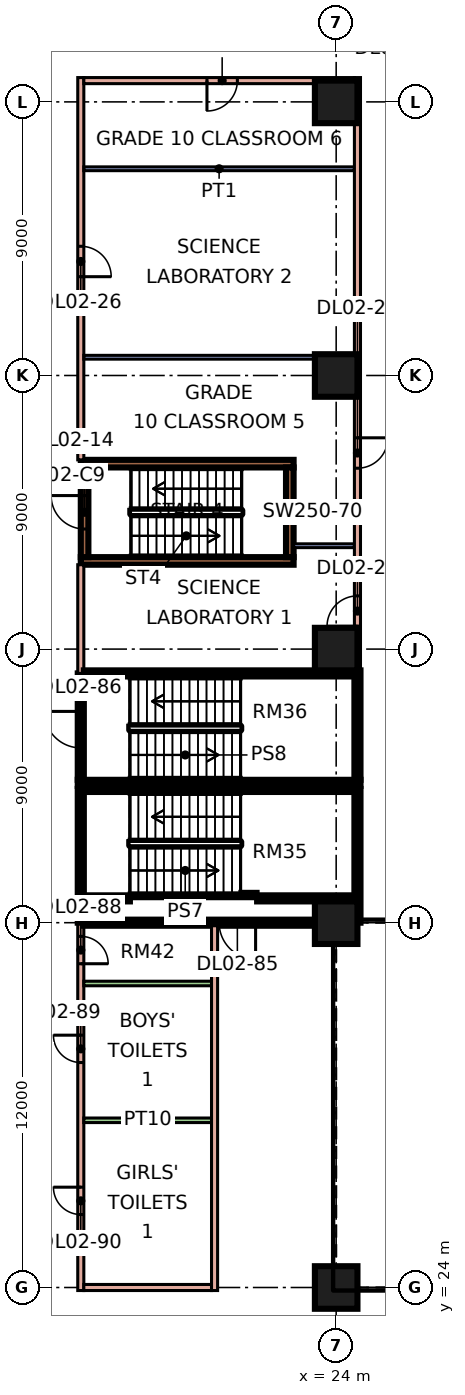
"""IFC4 building model, lengths in metres.
Left out: names, types, materials, properties, quantities, classifications, styles, units other than length and angle.
Written with IfcOpenShell. Run it as: python <this file> out.ifc"""

import sys

from ifc_helpers import new_model, si_unit, direction, frame, frame_2d, origin, origin_2d, place, context, subcontext, project, spatial, rectangle, extrude, element, fill, save


model = new_model("IFC4")
c1 = context("Model", 3, precision=1e-05, world=origin(), true_north=direction((0.0, 1.0)))
c2 = subcontext(c1, "Body", "Model", "MODEL_VIEW")
j1 = project(units=[si_unit("LENGTHUNIT", "METRE"), si_unit("PLANEANGLEUNIT", "RADIAN")], contexts=[c1])
p1 = place(None, origin())
s1 = spatial("IfcSite", under=j1, at=p1, CompositionType="ELEMENT")
p2 = place(p1, origin())
s2 = spatial("IfcBuilding", under=s1, at=p2, CompositionType="ELEMENT")
p3 = place(p2, frame((0.0, 0.0, 12.0)))
s3 = spatial("IfcBuildingStorey", under=s2, at=p3, CompositionType="ELEMENT", Elevation=12.0)
for number, where, z_axis, x_axis in (
    (1, (24.0, 24.0, 0.0), (0.0, 0.0, 1.0), (1.0, 0.0, 0.0)),
    (2, (24.0, 36.0, 0.0), (0.0, 0.0, 1.0), (1.0, 0.0, 0.0)),
    (3, (24.0, 45.0, 0.0), (0.0, 0.0, 1.0), (1.0, 0.0, 0.0)),
    (4, (24.0, 54.0, 0.0), (0.0, 0.0, 1.0), (1.0, 0.0, 0.0)),
    (5, (24.0, 63.0, 0.0), (0.0, 0.0, 1.0), (1.0, 0.0, 0.0)),
):
    element("IfcColumn", number, at=place(p3, frame(where, z_axis=z_axis, x_axis=x_axis)), inside=s3, PredefinedType="COLUMN", context=c2, shape_type="SweptSolid", body=[
        extrude(rectangle(XDim=1.4, YDim=1.4, at=origin_2d()), origin(), (0.0, 0.0, 1.0), 4.8),
    ])
for number, where, z_axis, x_axis in (
    (6, (15.6, 47.9, 0.0), (0.0, 0.0, 1.0), (1.0, 0.0, 0.0)),
    (7, (15.6, 51.1, 0.0), (0.0, 0.0, 1.0), (1.0, 0.0, 0.0)),
):
    element("IfcWall", number, at=place(p3, frame(where, z_axis=z_axis, x_axis=x_axis)), inside=s3, PredefinedType="SHEAR", context=c2, shape_type="SweptSolid", body=[
        extrude(rectangle(XDim=7.0, YDim=0.25, at=frame_2d((3.5, 0.0))), origin(), (0.0, 0.0, 1.0), 4.8),
    ])
p4 = place(p3, frame((15.725, 48.025, 0.0), z_axis=(0.0, 0.0, 1.0), x_axis=(0.0, 1.0, 0.0)))
e8 = element("IfcWall", 8, at=p4, inside=s3, PredefinedType="SHEAR", context=c2, shape_type="SweptSolid", body=[
    extrude(rectangle(XDim=2.95, YDim=0.25, at=frame_2d((1.475, 0.0))), origin(), (0.0, 0.0, 1.0), 4.8),
])
p5 = place(p4, frame((0.925, 0.0, 0.0)))
e9 = element("IfcOpeningElement", 9, at=p5, cuts=e8, PredefinedType="OPENING", context=c2, shape_type="SweptSolid", body=[
    extrude(rectangle(XDim=1.1, YDim=2.2, at=frame_2d((0.55, 1.1))), frame((0.0, 0.135, 0.0), z_axis=(0.0, -1.0, 0.0), x_axis=(1.0, 0.0, 0.0)), (0.0, 0.0, 1.0), 0.27),
])
p6 = place(p3, frame((22.475, 48.025, 0.0), z_axis=(0.0, 0.0, 1.0), x_axis=(0.0, 1.0, 0.0)))
e10 = element("IfcWall", 10, at=p6, inside=s3, PredefinedType="SHEAR", context=c2, shape_type="SweptSolid", body=[
    extrude(rectangle(XDim=2.95, YDim=0.25, at=frame_2d((1.475, 0.0))), origin(), (0.0, 0.0, 1.0), 4.8),
])
p7 = place(p3, frame((15.5, 40.6, 0.0), z_axis=(0.0, 0.0, 1.0), x_axis=(1.0, 0.0, 0.0)))
e11 = element("IfcWall", 11, at=p7, inside=s3, PredefinedType="SOLIDWALL", context=c2, shape_type="SweptSolid", body=[
    extrude(rectangle(XDim=9.3, YDim=0.2, at=frame_2d((4.65, 0.0))), origin(), (0.0, 0.0, 1.0), 4.4),
])
p8 = place(p3, frame((15.6, 23.9, 0.0), z_axis=(0.0, 0.0, 1.0), x_axis=(0.0, 1.0, 0.0)))
e12 = element("IfcWall", 12, at=p8, inside=s3, PredefinedType="PARTITIONING", context=c2, shape_type="SweptSolid", body=[
    extrude(rectangle(XDim=12.1, YDim=0.2, at=frame_2d((6.05, 0.0))), origin(), (0.0, 0.0, 1.0), 4.4),
])
p9 = place(p8, frame((10.75, 0.0, 0.0)))
e13 = element("IfcOpeningElement", 13, at=p9, cuts=e12, PredefinedType="OPENING", context=c2, shape_type="SweptSolid", body=[
    extrude(rectangle(XDim=0.9, YDim=2.1, at=frame_2d((0.45, 1.05))), frame((0.0, 0.11, 0.0), z_axis=(0.0, -1.0, 0.0), x_axis=(1.0, 0.0, 0.0)), (0.0, 0.0, 1.0), 0.22),
])
p10 = place(p8, frame((7.5, 0.0, 0.0)))
e14 = element("IfcOpeningElement", 14, at=p10, cuts=e12, PredefinedType="OPENING", context=c2, shape_type="SweptSolid", body=[
    extrude(rectangle(XDim=0.9, YDim=2.1, at=frame_2d((0.45, 1.05))), frame((0.0, 0.11, 0.0), z_axis=(0.0, -1.0, 0.0), x_axis=(1.0, 0.0, 0.0)), (0.0, 0.0, 1.0), 0.22),
])
p11 = place(p8, frame((2.5, 0.0, 0.0)))
e15 = element("IfcOpeningElement", 15, at=p11, cuts=e12, PredefinedType="OPENING", context=c2, shape_type="SweptSolid", body=[
    extrude(rectangle(XDim=0.9, YDim=2.1, at=frame_2d((0.45, 1.05))), frame((0.0, 0.11, 0.0), z_axis=(0.0, -1.0, 0.0), x_axis=(1.0, 0.0, 0.0)), (0.0, 0.0, 1.0), 0.22),
])
p12 = place(p3, frame((15.6, 36.0, 0.0), z_axis=(0.0, 0.0, 1.0), x_axis=(0.0, 1.0, 0.0)))
e16 = element("IfcWall", 16, at=p12, inside=s3, PredefinedType="SOLIDWALL", context=c2, shape_type="SweptSolid", body=[
    extrude(rectangle(XDim=4.4, YDim=0.2, at=frame_2d((2.2, 0.0))), origin(), (0.0, 0.0, 1.0), 4.4),
])
p13 = place(p3, frame((15.6, 40.7, 0.0), z_axis=(0.0, 0.0, 1.0), x_axis=(0.0, 1.0, 0.0)))
e17 = element("IfcWall", 17, at=p13, inside=s3, PredefinedType="SOLIDWALL", context=c2, shape_type="SweptSolid", body=[
    extrude(rectangle(XDim=3.5, YDim=0.2, at=frame_2d((1.75, 0.0))), origin(), (0.0, 0.0, 1.0), 4.4),
])
p14 = place(p13, frame((1.05, 0.0, 0.0)))
e18 = element("IfcOpeningElement", 18, at=p14, cuts=e17, PredefinedType="OPENING", context=c2, shape_type="SweptSolid", body=[
    extrude(rectangle(XDim=1.2, YDim=2.1, at=frame_2d((0.6, 1.05))), frame((0.0, 0.11, 0.0), z_axis=(0.0, -1.0, 0.0), x_axis=(1.0, 0.0, 0.0)), (0.0, 0.0, 1.0), 0.22),
])
p15 = place(p3, frame((15.6, 44.2, 0.0), z_axis=(0.0, 0.0, 1.0), x_axis=(0.0, 1.0, 0.0)))
e19 = element("IfcWall", 19, at=p15, inside=s3, PredefinedType="PARTITIONING", context=c2, shape_type="SweptSolid", body=[
    extrude(rectangle(XDim=3.575, YDim=0.2, at=frame_2d((1.788, 0.0))), origin(), (0.0, 0.0, 1.0), 4.4),
])
p16 = place(p3, frame((15.6, 51.225, 0.0), z_axis=(0.0, 0.0, 1.0), x_axis=(0.0, 1.0, 0.0)))
e20 = element("IfcWall", 20, at=p16, inside=s3, PredefinedType="PARTITIONING", context=c2, shape_type="SweptSolid", body=[
    extrude(rectangle(XDim=12.575, YDim=0.2, at=frame_2d((6.288, 0.0))), origin(), (0.0, 0.0, 1.0), 4.4),
])
p17 = place(p16, frame((6.025, 0.0, 0.0)))
e21 = element("IfcOpeningElement", 21, at=p17, cuts=e20, PredefinedType="OPENING", context=c2, shape_type="SweptSolid", body=[
    extrude(rectangle(XDim=1.0, YDim=2.1, at=frame_2d((0.5, 1.05))), frame((0.0, 0.11, 0.0), z_axis=(0.0, -1.0, 0.0), x_axis=(1.0, 0.0, 0.0)), (0.0, 0.0, 1.0), 0.22),
])
p18 = place(p3, frame((15.7, 24.0, 0.0), z_axis=(0.0, 0.0, 1.0), x_axis=(1.0, 0.0, 0.0)))
e22 = element("IfcWall", 22, at=p18, inside=s3, PredefinedType="PARTITIONING", context=c2, shape_type="SweptSolid", body=[
    extrude(rectangle(XDim=4.2, YDim=0.2, at=frame_2d((2.1, 0.0))), origin(), (0.0, 0.0, 1.0), 4.4),
])
for number, where, z_axis, x_axis in (
    (23, (15.7, 29.5, 0.0), (0.0, 0.0, 1.0), (1.0, 0.0, 0.0)),
    (24, (15.7, 34.0, 0.0), (0.0, 0.0, 1.0), (1.0, 0.0, 0.0)),
):
    element("IfcWall", number, at=place(p3, frame(where, z_axis=z_axis, x_axis=x_axis)), inside=s3, PredefinedType="PARTITIONING", context=c2, shape_type="SweptSolid", body=[
        extrude(rectangle(XDim=4.2, YDim=0.15, at=frame_2d((2.1, 0.0))), origin(), (0.0, 0.0, 1.0), 4.4),
    ])
p19 = place(p3, frame((15.7, 36.0, 0.0), z_axis=(0.0, 0.0, 1.0), x_axis=(1.0, 0.0, 0.0)))
e25 = element("IfcWall", 25, at=p19, inside=s3, PredefinedType="SOLIDWALL", context=c2, shape_type="SweptSolid", body=[
    extrude(rectangle(XDim=8.3, YDim=0.2, at=frame_2d((4.15, 0.0))), origin(), (0.0, 0.0, 1.0), 4.4),
])
p20 = place(p19, frame((4.45, 0.0, 0.0)))
e26 = element("IfcOpeningElement", 26, at=p20, cuts=e25, PredefinedType="OPENING", context=c2, shape_type="SweptSolid", body=[
    extrude(rectangle(XDim=1.2, YDim=2.1, at=frame_2d((0.6, 1.05))), frame((0.0, 0.11, 0.0), z_axis=(0.0, -1.0, 0.0), x_axis=(1.0, 0.0, 0.0)), (0.0, 0.0, 1.0), 0.22),
])
p21 = place(p3, frame((15.7, 44.2, 0.0), z_axis=(0.0, 0.0, 1.0), x_axis=(1.0, 0.0, 0.0)))
e27 = element("IfcWall", 27, at=p21, inside=s3, PredefinedType="SOLIDWALL", context=c2, shape_type="SweptSolid", body=[
    extrude(rectangle(XDim=8.9, YDim=0.2, at=frame_2d((4.45, 0.0))), origin(), (0.0, 0.0, 1.0), 4.4),
])
for number, where, z_axis, x_axis in (
    (28, (15.7, 54.6, 0.0), (0.0, 0.0, 1.0), (1.0, 0.0, 0.0)),
    (29, (15.7, 60.8, 0.0), (0.0, 0.0, 1.0), (1.0, 0.0, 0.0)),
):
    element("IfcWall", number, at=place(p3, frame(where, z_axis=z_axis, x_axis=x_axis)), inside=s3, PredefinedType="PARTITIONING", context=c2, shape_type="SweptSolid", body=[
        extrude(rectangle(XDim=8.9, YDim=0.125, at=frame_2d((4.45, 0.0))), origin(), (0.0, 0.0, 1.0), 4.4),
    ])
p22 = place(p3, frame((15.7, 63.7, 0.0), z_axis=(0.0, 0.0, 1.0), x_axis=(1.0, 0.0, 0.0)))
e30 = element("IfcWall", 30, at=p22, inside=s3, PredefinedType="PARTITIONING", context=c2, shape_type="SweptSolid", body=[
    extrude(rectangle(XDim=8.9, YDim=0.2, at=frame_2d((4.45, 0.0))), origin(), (0.0, 0.0, 1.0), 4.4),
])
p23 = place(p22, frame((4.05, 0.0, 0.0)))
e31 = element("IfcOpeningElement", 31, at=p23, cuts=e30, PredefinedType="OPENING", context=c2, shape_type="SweptSolid", body=[
    extrude(rectangle(XDim=1.0, YDim=2.1, at=frame_2d((0.5, 1.05))), frame((0.0, 0.11, 0.0), z_axis=(0.0, -1.0, 0.0), x_axis=(1.0, 0.0, 0.0)), (0.0, 0.0, 1.0), 0.22),
])
p24 = place(p3, frame((20.0, 23.9, 0.0), z_axis=(0.0, 0.0, 1.0), x_axis=(0.0, 1.0, 0.0)))
e32 = element("IfcWall", 32, at=p24, inside=s3, PredefinedType="PARTITIONING", context=c2, shape_type="SweptSolid", body=[
    extrude(rectangle(XDim=12.0, YDim=0.2, at=frame_2d((6.0, 0.0))), origin(), (0.0, 0.0, 1.0), 4.4),
])
p25 = place(p3, frame((22.6, 48.4, 0.0), z_axis=(0.0, 0.0, 1.0), x_axis=(1.0, 0.0, 0.0)))
e33 = element("IfcWall", 33, at=p25, inside=s3, PredefinedType="PARTITIONING", context=c2, shape_type="SweptSolid", body=[
    extrude(rectangle(XDim=2.0, YDim=0.125, at=frame_2d((1.0, 0.0))), origin(), (0.0, 0.0, 1.0), 4.4),
])
p26 = place(p3, frame((24.7, 36.0, 0.0), z_axis=(0.0, 0.0, 1.0), x_axis=(0.0, 1.0, 0.0)))
e34 = element("IfcWall", 34, at=p26, inside=s3, PredefinedType="SOLIDWALL", context=c2, shape_type="SweptSolid", body=[
    extrude(rectangle(XDim=4.4, YDim=0.2, at=frame_2d((2.2, 0.0))), origin(), (0.0, 0.0, 1.0), 4.4),
])
p27 = place(p3, frame((24.7, 40.7, 0.0), z_axis=(0.0, 0.0, 1.0), x_axis=(0.0, 1.0, 0.0)))
e35 = element("IfcWall", 35, at=p27, inside=s3, PredefinedType="SOLIDWALL", context=c2, shape_type="SweptSolid", body=[
    extrude(rectangle(XDim=3.6, YDim=0.2, at=frame_2d((1.8, 0.0))), origin(), (0.0, 0.0, 1.0), 4.4),
])
p28 = place(p3, frame((24.7, 44.3, 0.0), z_axis=(0.0, 0.0, 1.0), x_axis=(0.0, 1.0, 0.0)))
e36 = element("IfcWall", 36, at=p28, inside=s3, PredefinedType="PARTITIONING", context=c2, shape_type="SweptSolid", body=[
    extrude(rectangle(XDim=19.5, YDim=0.2, at=frame_2d((9.75, 0.0))), origin(), (0.0, 0.0, 1.0), 4.4),
])
p29 = place(p28, frame((1.45, 0.0, 0.0)))
e37 = element("IfcOpeningElement", 37, at=p29, cuts=e36, PredefinedType="OPENING", context=c2, shape_type="SweptSolid", body=[
    extrude(rectangle(XDim=1.0, YDim=2.1, at=frame_2d((0.5, 1.05))), frame((0.0, 0.11, 0.0), z_axis=(0.0, -1.0, 0.0), x_axis=(1.0, 0.0, 0.0)), (0.0, 0.0, 1.0), 0.22),
])
p30 = place(p28, frame((6.65, 0.0, 0.0)))
e38 = element("IfcOpeningElement", 38, at=p30, cuts=e36, PredefinedType="OPENING", context=c2, shape_type="SweptSolid", body=[
    extrude(rectangle(XDim=1.0, YDim=2.1, at=frame_2d((0.5, 1.05))), frame((0.0, 0.11, 0.0), z_axis=(0.0, -1.0, 0.0), x_axis=(1.0, 0.0, 0.0)), (0.0, 0.0, 1.0), 0.22),
])
p31 = place(p3, frame((21.4, 36.8, 0.0), z_axis=(0.0, 0.0, 1.0), x_axis=(1.0, 0.0, 0.0)))
e39 = element("IfcWall", 39, at=p31, inside=s3, PredefinedType="SOLIDWALL", context=c2, shape_type="SweptSolid", body=[
    extrude(rectangle(XDim=3.2, YDim=0.2, at=frame_2d((1.6, 0.0))), origin(), (0.0, 0.0, 1.0), 4.4),
])
p32 = place(p3, frame((20.855, 40.4, 0.0), z_axis=(0.0, 0.0, 1.0), x_axis=(1.0, 0.0, 0.0)))
e40 = element("IfcWall", 40, at=p32, inside=s3, PredefinedType="SOLIDWALL", context=c2, shape_type="SweptSolid", body=[
    extrude(rectangle(XDim=3.745, YDim=0.2, at=frame_2d((1.873, 0.0))), origin(), (0.0, 0.0, 1.0), 4.4),
])
for number, where, z_axis, x_axis in (
    (41, (15.7, 36.8, 0.0), (0.0, 0.0, 1.0), (1.0, 0.0, 0.0)),
    (42, (15.7, 40.4, 0.0), (0.0, 0.0, 1.0), (1.0, 0.0, 0.0)),
):
    element("IfcWall", number, at=place(p3, frame(where, z_axis=z_axis, x_axis=x_axis)), inside=s3, PredefinedType="SOLIDWALL", context=c2, shape_type="SweptSolid", body=[
        extrude(rectangle(XDim=1.515, YDim=0.2, at=frame_2d((0.758, 0.0))), origin(), (0.0, 0.0, 1.0), 4.4),
    ])
p33 = place(p5, frame((1.1, 0.0, 0.0), z_axis=(0.0, 0.0, 1.0), x_axis=(-1.0, 0.0, 0.0)))
e43 = element("IfcDoor", 43, at=p33, inside=s3, OperationType="SINGLE_SWING_RIGHT", PredefinedType="DOOR", context=c2, shape_type="SweptSolid", body=[
    extrude(rectangle(XDim=1.1, YDim=2.2, at=frame_2d((0.55, 1.1))), frame((0.0, 0.025, 0.0), z_axis=(0.0, -1.0, 0.0), x_axis=(1.0, 0.0, 0.0)), (0.0, 0.0, 1.0), 0.05),
])
fill(e9, e43)
p34 = place(p29, origin())
e44 = element("IfcDoor", 44, at=p34, inside=s3, OperationType="SINGLE_SWING_LEFT", PredefinedType="DOOR", context=c2, shape_type="SweptSolid", body=[
    extrude(rectangle(XDim=1.0, YDim=2.1, at=frame_2d((0.5, 1.05))), frame((0.0, 0.025, 0.0), z_axis=(0.0, -1.0, 0.0), x_axis=(1.0, 0.0, 0.0)), (0.0, 0.0, 1.0), 0.05),
])
fill(e37, e44)
p35 = place(p30, origin())
e45 = element("IfcDoor", 45, at=p35, inside=s3, OperationType="SINGLE_SWING_RIGHT", PredefinedType="DOOR", context=c2, shape_type="SweptSolid", body=[
    extrude(rectangle(XDim=1.0, YDim=2.1, at=frame_2d((0.5, 1.05))), frame((0.0, 0.025, 0.0), z_axis=(0.0, -1.0, 0.0), x_axis=(1.0, 0.0, 0.0)), (0.0, 0.0, 1.0), 0.05),
])
fill(e38, e45)
p36 = place(p17, frame((1.0, 0.0, 0.0), z_axis=(0.0, 0.0, 1.0), x_axis=(-1.0, 0.0, 0.0)))
e46 = element("IfcDoor", 46, at=p36, inside=s3, OperationType="SINGLE_SWING_LEFT", PredefinedType="DOOR", context=c2, shape_type="SweptSolid", body=[
    extrude(rectangle(XDim=1.0, YDim=2.1, at=frame_2d((0.5, 1.05))), frame((0.0, 0.025, 0.0), z_axis=(0.0, -1.0, 0.0), x_axis=(1.0, 0.0, 0.0)), (0.0, 0.0, 1.0), 0.05),
])
fill(e21, e46)
p37 = place(p23, frame((1.0, 0.0, 0.0), z_axis=(0.0, 0.0, 1.0), x_axis=(-1.0, 0.0, 0.0)))
e47 = element("IfcDoor", 47, at=p37, inside=s3, OperationType="SINGLE_SWING_LEFT", PredefinedType="DOOR", context=c2, shape_type="SweptSolid", body=[
    extrude(rectangle(XDim=1.0, YDim=2.1, at=frame_2d((0.5, 1.05))), frame((0.0, 0.025, 0.0), z_axis=(0.0, -1.0, 0.0), x_axis=(1.0, 0.0, 0.0)), (0.0, 0.0, 1.0), 0.05),
])
fill(e31, e47)
p38 = place(p20, origin())
e48 = element("IfcDoor", 48, at=p38, inside=s3, OperationType="SINGLE_SWING_RIGHT", PredefinedType="DOOR", context=c2, shape_type="SweptSolid", body=[
    extrude(rectangle(XDim=1.2, YDim=2.1, at=frame_2d((0.6, 1.05))), frame((0.0, 0.025, 0.0), z_axis=(0.0, -1.0, 0.0), x_axis=(1.0, 0.0, 0.0)), (0.0, 0.0, 1.0), 0.05),
])
fill(e26, e48)
p39 = place(p14, frame((1.2, 0.0, 0.0), z_axis=(0.0, 0.0, 1.0), x_axis=(-1.0, 0.0, 0.0)))
e49 = element("IfcDoor", 49, at=p39, inside=s3, OperationType="SINGLE_SWING_RIGHT", PredefinedType="DOOR", context=c2, shape_type="SweptSolid", body=[
    extrude(rectangle(XDim=1.2, YDim=2.1, at=frame_2d((0.6, 1.05))), frame((0.0, 0.025, 0.0), z_axis=(0.0, -1.0, 0.0), x_axis=(1.0, 0.0, 0.0)), (0.0, 0.0, 1.0), 0.05),
])
fill(e18, e49)
p40 = place(p9, frame((0.9, 0.0, 0.0), z_axis=(0.0, 0.0, 1.0), x_axis=(-1.0, 0.0, 0.0)))
e50 = element("IfcDoor", 50, at=p40, inside=s3, OperationType="SINGLE_SWING_LEFT", PredefinedType="DOOR", context=c2, shape_type="SweptSolid", body=[
    extrude(rectangle(XDim=0.9, YDim=2.1, at=frame_2d((0.45, 1.05))), frame((0.0, 0.025, 0.0), z_axis=(0.0, -1.0, 0.0), x_axis=(1.0, 0.0, 0.0)), (0.0, 0.0, 1.0), 0.05),
])
fill(e13, e50)
p41 = place(p10, frame((0.9, 0.0, 0.0), z_axis=(0.0, 0.0, 1.0), x_axis=(-1.0, 0.0, 0.0)))
e51 = element("IfcDoor", 51, at=p41, inside=s3, OperationType="SINGLE_SWING_RIGHT", PredefinedType="DOOR", context=c2, shape_type="SweptSolid", body=[
    extrude(rectangle(XDim=0.9, YDim=2.1, at=frame_2d((0.45, 1.05))), frame((0.0, 0.025, 0.0), z_axis=(0.0, -1.0, 0.0), x_axis=(1.0, 0.0, 0.0)), (0.0, 0.0, 1.0), 0.05),
])
fill(e14, e51)
p42 = place(p11, frame((0.9, 0.0, 0.0), z_axis=(0.0, 0.0, 1.0), x_axis=(-1.0, 0.0, 0.0)))
e52 = element("IfcDoor", 52, at=p42, inside=s3, OperationType="SINGLE_SWING_RIGHT", PredefinedType="DOOR", context=c2, shape_type="SweptSolid", body=[
    extrude(rectangle(XDim=0.9, YDim=2.1, at=frame_2d((0.45, 1.05))), frame((0.0, 0.025, 0.0), z_axis=(0.0, -1.0, 0.0), x_axis=(1.0, 0.0, 0.0)), (0.0, 0.0, 1.0), 0.05),
])
fill(e15, e52)
save(model, sys.argv[1])
